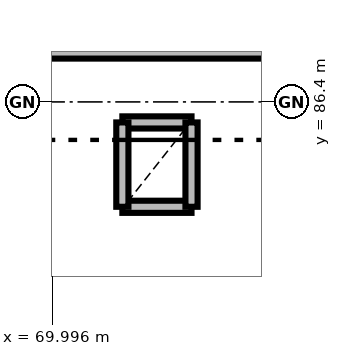
"""IFC4 building model, lengths in metres.
Left out: names, types, materials, properties, quantities, classifications, styles, units other than length and angle.
Written with IfcOpenShell. Run it as: python <this file> out.ifc"""

import sys

from ifc_helpers import new_model, si_unit, direction, frame, frame_2d, origin, place, context, subcontext, project, spatial, rectangle, extrude, element, save


model = new_model("IFC4")
c1 = context("Model", 3, precision=1e-05, world=origin(), true_north=direction((0.0, 1.0)))
c2 = subcontext(c1, "Body", "Model", "MODEL_VIEW")
j1 = project(units=[si_unit("LENGTHUNIT", "METRE"), si_unit("PLANEANGLEUNIT", "RADIAN")], contexts=[c1])
p1 = place(None, origin())
s1 = spatial("IfcSite", under=j1, at=p1, CompositionType="ELEMENT")
p2 = place(p1, origin())
s2 = spatial("IfcBuilding", under=s1, at=p2, CompositionType="ELEMENT")
p3 = place(p2, frame((0.0, 0.0, 9.3)))
s3 = spatial("IfcBuildingStorey", under=s2, at=p3, CompositionType="ELEMENT", Elevation=9.3)
for number, where, z_axis, x_axis in (
    (1, (70.92, 85.02, 0.0), (0.0, 0.0, 1.0), (1.0, 0.0, 0.0)),
    (2, (71.83, 86.13, 0.0), (0.0, 0.0, 1.0), (-1.0, 0.0, 0.0)),
):
    element("IfcWall", number, at=place(p3, frame(where, z_axis=z_axis, x_axis=x_axis)), inside=s3, PredefinedType="PARTITIONING", context=c2, shape_type="SweptSolid", body=[
        extrude(rectangle(XDim=0.91, YDim=0.16, at=frame_2d((0.455, 0.0))), origin(), (0.0, 0.0, 1.0), 3.65),
    ])
for number, where, z_axis, x_axis in (
    (3, (70.92, 86.13, 0.0), (0.0, 0.0, 1.0), (0.0, -1.0, 0.0)),
    (4, (71.83, 85.02, 0.0), (0.0, 0.0, 1.0), (0.0, 1.0, 0.0)),
):
    element("IfcWall", number, at=place(p3, frame(where, z_axis=z_axis, x_axis=x_axis)), inside=s3, PredefinedType="PARTITIONING", context=c2, shape_type="SweptSolid", body=[
        extrude(rectangle(XDim=1.11, YDim=0.16, at=frame_2d((0.555, 0.0))), origin(), (0.0, 0.0, 1.0), 3.65),
    ])
p4 = place(p3, frame((72.91, 87.05, 0.0), z_axis=(0.0, 0.0, 1.0), x_axis=(-1.0, 0.0, 0.0)))
e5 = element("IfcWall", 5, at=p4, inside=s3, PredefinedType="PARTITIONING", context=c2, shape_type="SweptSolid", body=[
    extrude(rectangle(XDim=22.51, YDim=0.16, at=frame_2d((11.255, 0.0))), origin(), (0.0, 0.0, 1.0), 3.325),
])
p5 = place(p4, frame((7.035, 0.0, 0.0)))
e6 = element("IfcOpeningElement", 6, at=p5, cuts=e5, PredefinedType="OPENING", context=c2, shape_type="SweptSolid", body=[
    extrude(rectangle(XDim=1.55, YDim=2.2, at=frame_2d((0.775, 1.1))), frame((0.0, 0.09, 0.0), z_axis=(0.0, -1.0, 0.0), x_axis=(1.0, 0.0, 0.0)), (0.0, 0.0, 1.0), 0.18),
])
save(model, sys.argv[1])
